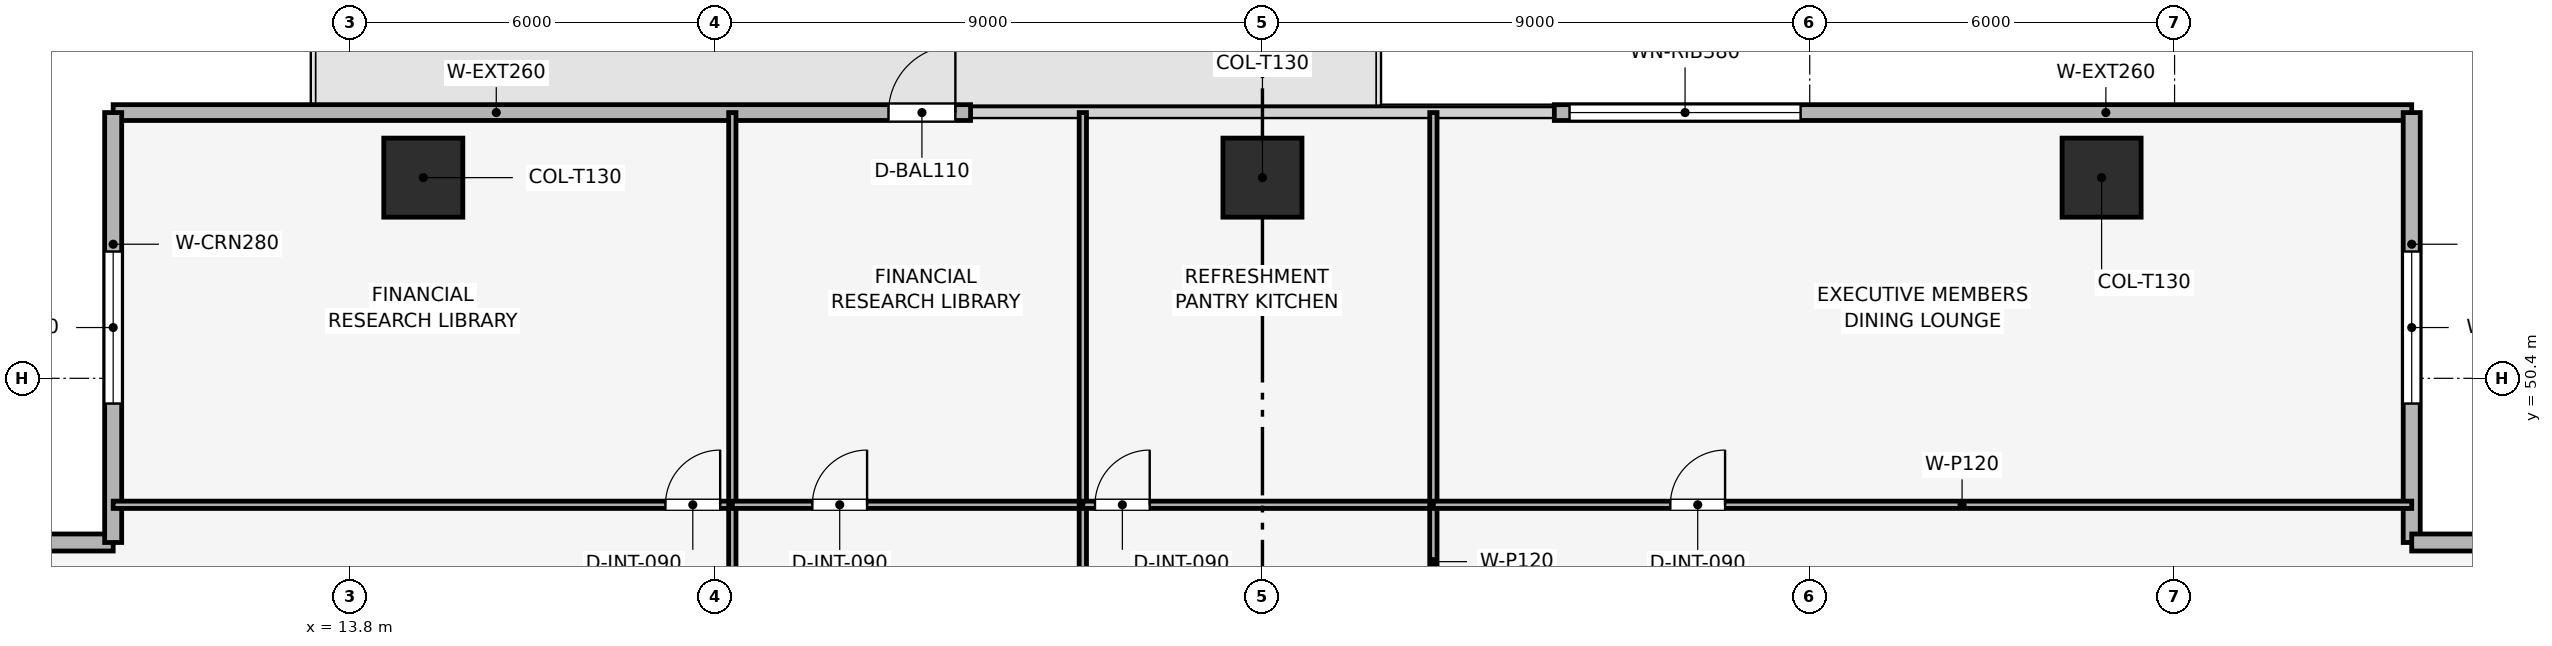
"""IFC4 building model, lengths in metres.
Left out: names, types, materials, properties, quantities, classifications, styles, units other than length and angle.
Written with IfcOpenShell. Run it as: python <this file> out.ifc"""

import sys

from ifc_helpers import new_model, si_unit, direction, frame, frame_2d, origin, origin_2d, place, context, subcontext, project, spatial, rectangle, extrude, element, fill, save


model = new_model("IFC4")
c1 = context("Model", 3, precision=1e-05, world=origin(), true_north=direction((0.0, 1.0)))
c2 = subcontext(c1, "Body", "Model", "MODEL_VIEW")
j1 = project(units=[si_unit("LENGTHUNIT", "METRE"), si_unit("PLANEANGLEUNIT", "RADIAN")], contexts=[c1])
p1 = place(None, origin())
s1 = spatial("IfcSite", under=j1, at=p1, CompositionType="ELEMENT")
p2 = place(p1, origin())
s2 = spatial("IfcBuilding", under=s1, at=p2, CompositionType="ELEMENT")
p3 = place(p2, frame((0.0, 0.0, 117.3)))
s3 = spatial("IfcBuildingStorey", under=s2, at=p3, CompositionType="ELEMENT", Elevation=117.3)
for number, where, z_axis, x_axis in (
    (1, (42.6, 53.7, 0.003), (0.0, 0.0, 1.0), (1.0, 0.0, 0.0)),
    (2, (28.8, 53.7, 0.003), (0.0, 0.0, 1.0), (1.0, 0.0, 0.0)),
    (3, (15.0, 53.7, 0.003), (0.0, 0.0, 1.0), (1.0, 0.0, 0.0)),
):
    element("IfcColumn", number, at=place(p3, frame(where, z_axis=z_axis, x_axis=x_axis)), inside=s3, PredefinedType="COLUMN", context=c2, shape_type="SweptSolid", body=[
        extrude(rectangle(XDim=1.3, YDim=1.3, at=origin_2d()), origin(), (0.0, 0.0, 1.0), 3.644),
    ])
p4 = place(p3, frame((9.9, 54.77, 0.0), z_axis=(0.0, 0.0, 1.0), x_axis=(1.0, 0.0, 0.0)))
e4 = element("IfcWall", 4, at=p4, inside=s3, PredefinedType="SOLIDWALL", context=c2, shape_type="SweptSolid", body=[
    extrude(rectangle(XDim=14.1, YDim=0.26, at=frame_2d((7.05, 0.0))), origin(), (0.0, 0.0, 1.0), 3.65),
])
p5 = place(p4, frame((12.75, 0.0, 0.0)))
e5 = element("IfcOpeningElement", 5, at=p5, cuts=e4, PredefinedType="OPENING", context=c2, shape_type="SweptSolid", body=[
    extrude(rectangle(XDim=1.1, YDim=2.2, at=frame_2d((0.55, 1.1))), frame((0.0, 0.14, 0.0), z_axis=(0.0, -1.0, 0.0), x_axis=(1.0, 0.0, 0.0)), (0.0, 0.0, 1.0), 0.28),
])
p6 = place(p3, frame((33.6, 54.77, 0.0), z_axis=(0.0, 0.0, 1.0), x_axis=(1.0, 0.0, 0.0)))
e6 = element("IfcWall", 6, at=p6, inside=s3, PredefinedType="SOLIDWALL", context=c2, shape_type="SweptSolid", body=[
    extrude(rectangle(XDim=14.1, YDim=0.26, at=frame_2d((7.05, 0.0))), origin(), (0.0, 0.0, 1.0), 3.65),
])
p7 = place(p6, frame((0.25, 0.0, 0.9)))
e7 = element("IfcOpeningElement", 7, at=p7, cuts=e6, PredefinedType="OPENING", context=c2, shape_type="SweptSolid", body=[
    extrude(rectangle(XDim=3.8, YDim=1.9, at=frame_2d((1.9, 0.95))), frame((0.0, 0.14, 0.0), z_axis=(0.0, -1.0, 0.0), x_axis=(1.0, 0.0, 0.0)), (0.0, 0.0, 1.0), 0.28),
])
p8 = place(p3, frame((2.83, 47.7, 0.0), z_axis=(0.0, 0.0, 1.0), x_axis=(1.0, 0.0, 0.0)))
e8 = element("IfcWall", 8, at=p8, inside=s3, PredefinedType="SOLIDWALL", context=c2, shape_type="SweptSolid", body=[
    extrude(rectangle(XDim=7.07, YDim=0.28, at=frame_2d((3.535, 0.0))), origin(), (0.0, 0.0, 1.0), 3.65),
])
p9 = place(p8, frame((2.285, 0.0, 0.9)))
e9 = element("IfcOpeningElement", 9, at=p9, cuts=e8, PredefinedType="OPENING", context=c2, shape_type="SweptSolid", body=[
    extrude(rectangle(XDim=2.5, YDim=1.9, at=frame_2d((1.25, 0.95))), frame((0.0, 0.15, 0.0), z_axis=(0.0, -1.0, 0.0), x_axis=(1.0, 0.0, 0.0)), (0.0, 0.0, 1.0), 0.3),
])
p10 = place(p3, frame((9.9, 47.7, 0.0), z_axis=(0.0, 0.0, 1.0), x_axis=(0.0, 1.0, 0.0)))
e10 = element("IfcWall", 10, at=p10, inside=s3, PredefinedType="SOLIDWALL", context=c2, shape_type="SweptSolid", body=[
    extrude(rectangle(XDim=7.07, YDim=0.28, at=frame_2d((3.535, 0.0))), origin(), (0.0, 0.0, 1.0), 3.65),
])
p11 = place(p10, frame((2.285, 0.0, 0.9)))
e11 = element("IfcOpeningElement", 11, at=p11, cuts=e10, PredefinedType="OPENING", context=c2, shape_type="SweptSolid", body=[
    extrude(rectangle(XDim=2.5, YDim=1.9, at=frame_2d((1.25, 0.95))), frame((0.0, 0.15, 0.0), z_axis=(0.0, -1.0, 0.0), x_axis=(1.0, 0.0, 0.0)), (0.0, 0.0, 1.0), 0.3),
])
p12 = place(p3, frame((47.7, 54.77, 0.0), z_axis=(0.0, 0.0, 1.0), x_axis=(0.0, -1.0, 0.0)))
e12 = element("IfcWall", 12, at=p12, inside=s3, PredefinedType="SOLIDWALL", context=c2, shape_type="SweptSolid", body=[
    extrude(rectangle(XDim=7.07, YDim=0.28, at=frame_2d((3.535, 0.0))), origin(), (0.0, 0.0, 1.0), 3.65),
])
p13 = place(p12, frame((2.285, 0.0, 0.9)))
e13 = element("IfcOpeningElement", 13, at=p13, cuts=e12, PredefinedType="OPENING", context=c2, shape_type="SweptSolid", body=[
    extrude(rectangle(XDim=2.5, YDim=1.9, at=frame_2d((1.25, 0.95))), frame((0.0, 0.15, 0.0), z_axis=(0.0, -1.0, 0.0), x_axis=(1.0, 0.0, 0.0)), (0.0, 0.0, 1.0), 0.3),
])
p14 = place(p3, frame((47.7, 47.7, 0.0), z_axis=(0.0, 0.0, 1.0), x_axis=(1.0, 0.0, 0.0)))
e14 = element("IfcWall", 14, at=p14, inside=s3, PredefinedType="SOLIDWALL", context=c2, shape_type="SweptSolid", body=[
    extrude(rectangle(XDim=7.07, YDim=0.28, at=frame_2d((3.535, 0.0))), origin(), (0.0, 0.0, 1.0), 3.65),
])
p15 = place(p14, frame((2.285, 0.0, 0.9)))
e15 = element("IfcOpeningElement", 15, at=p15, cuts=e14, PredefinedType="OPENING", context=c2, shape_type="SweptSolid", body=[
    extrude(rectangle(XDim=2.5, YDim=1.9, at=frame_2d((1.25, 0.95))), frame((0.0, 0.15, 0.0), z_axis=(0.0, -1.0, 0.0), x_axis=(1.0, 0.0, 0.0)), (0.0, 0.0, 1.0), 0.3),
])
p16 = place(p3, frame((9.9, 48.32, 0.0), z_axis=(0.0, 0.0, 1.0), x_axis=(1.0, 0.0, 0.0)))
e16 = element("IfcWall", 16, at=p16, inside=s3, PredefinedType="PARTITIONING", context=c2, shape_type="SweptSolid", body=[
    extrude(rectangle(XDim=10.182, YDim=0.12, at=frame_2d((5.091, 0.0))), origin(), (0.0, 0.0, 1.0), 3.035),
])
p17 = place(p16, frame((9.082, 0.0, 0.0)))
e17 = element("IfcOpeningElement", 17, at=p17, cuts=e16, PredefinedType="OPENING", context=c2, shape_type="SweptSolid", body=[
    extrude(rectangle(XDim=0.9, YDim=2.1, at=frame_2d((0.45, 1.05))), frame((0.0, 0.07, 0.0), z_axis=(0.0, -1.0, 0.0), x_axis=(1.0, 0.0, 0.0)), (0.0, 0.0, 1.0), 0.14),
])
p18 = place(p3, frame((20.082, 40.0, 0.0), z_axis=(0.0, 0.0, 1.0), x_axis=(0.0, 1.0, 0.0)))
e18 = element("IfcWall", 18, at=p18, inside=s3, PredefinedType="PARTITIONING", context=c2, shape_type="SweptSolid", body=[
    extrude(rectangle(XDim=14.77, YDim=0.12, at=frame_2d((7.385, 0.0))), origin(), (0.0, 0.0, 1.0), 3.035),
])
p19 = place(p3, frame((20.082, 48.32, 0.0), z_axis=(0.0, 0.0, 1.0), x_axis=(1.0, 0.0, 0.0)))
e19 = element("IfcWall", 19, at=p19, inside=s3, PredefinedType="PARTITIONING", context=c2, shape_type="SweptSolid", body=[
    extrude(rectangle(XDim=5.764, YDim=0.12, at=frame_2d((2.882, 0.0))), origin(), (0.0, 0.0, 1.0), 3.185),
])
p20 = place(p19, frame((1.316, 0.0, 0.0)))
e20 = element("IfcOpeningElement", 20, at=p20, cuts=e19, PredefinedType="OPENING", context=c2, shape_type="SweptSolid", body=[
    extrude(rectangle(XDim=0.9, YDim=2.1, at=frame_2d((0.45, 1.05))), frame((0.0, 0.07, 0.0), z_axis=(0.0, -1.0, 0.0), x_axis=(1.0, 0.0, 0.0)), (0.0, 0.0, 1.0), 0.14),
])
p21 = place(p3, frame((25.846, 40.0, 0.0), z_axis=(0.0, 0.0, 1.0), x_axis=(0.0, 1.0, 0.0)))
e21 = element("IfcWall", 21, at=p21, inside=s3, PredefinedType="PARTITIONING", context=c2, shape_type="SweptSolid", body=[
    extrude(rectangle(XDim=14.77, YDim=0.12, at=frame_2d((7.385, 0.0))), origin(), (0.0, 0.0, 1.0), 3.035),
])
p22 = place(p3, frame((25.846, 48.32, 0.0), z_axis=(0.0, 0.0, 1.0), x_axis=(1.0, 0.0, 0.0)))
e22 = element("IfcWall", 22, at=p22, inside=s3, PredefinedType="PARTITIONING", context=c2, shape_type="SweptSolid", body=[
    extrude(rectangle(XDim=5.765, YDim=0.12, at=frame_2d((2.883, 0.0))), origin(), (0.0, 0.0, 1.0), 3.185),
])
p23 = place(p22, frame((0.2, 0.0, 0.0)))
e23 = element("IfcOpeningElement", 23, at=p23, cuts=e22, PredefinedType="OPENING", context=c2, shape_type="SweptSolid", body=[
    extrude(rectangle(XDim=0.9, YDim=2.1, at=frame_2d((0.45, 1.05))), frame((0.0, 0.07, 0.0), z_axis=(0.0, -1.0, 0.0), x_axis=(1.0, 0.0, 0.0)), (0.0, 0.0, 1.0), 0.14),
])
p24 = place(p3, frame((31.611, 40.0, 0.0), z_axis=(0.0, 0.0, 1.0), x_axis=(0.0, 1.0, 0.0)))
e24 = element("IfcWall", 24, at=p24, inside=s3, PredefinedType="PARTITIONING", context=c2, shape_type="SweptSolid", body=[
    extrude(rectangle(XDim=14.77, YDim=0.12, at=frame_2d((7.385, 0.0))), origin(), (0.0, 0.0, 1.0), 3.035),
])
p25 = place(p3, frame((31.611, 48.32, 0.0), z_axis=(0.0, 0.0, 1.0), x_axis=(1.0, 0.0, 0.0)))
e25 = element("IfcWall", 25, at=p25, inside=s3, PredefinedType="PARTITIONING", context=c2, shape_type="SweptSolid", body=[
    extrude(rectangle(XDim=16.089, YDim=0.12, at=frame_2d((8.044, 0.0))), origin(), (0.0, 0.0, 1.0), 3.035),
])
p26 = place(p25, frame((3.897, 0.0, 0.0)))
e26 = element("IfcOpeningElement", 26, at=p26, cuts=e25, PredefinedType="OPENING", context=c2, shape_type="SweptSolid", body=[
    extrude(rectangle(XDim=0.9, YDim=2.1, at=frame_2d((0.45, 1.05))), frame((0.0, 0.07, 0.0), z_axis=(0.0, -1.0, 0.0), x_axis=(1.0, 0.0, 0.0)), (0.0, 0.0, 1.0), 0.14),
])
p27 = place(p5, origin())
e27 = element("IfcDoor", 27, at=p27, inside=s3, OperationType="SINGLE_SWING_RIGHT", PredefinedType="DOOR", context=c2, shape_type="SweptSolid", body=[
    extrude(rectangle(XDim=1.1, YDim=2.2, at=frame_2d((0.55, 1.1))), frame((0.0, 0.025, 0.0), z_axis=(0.0, -1.0, 0.0), x_axis=(1.0, 0.0, 0.0)), (0.0, 0.0, 1.0), 0.05),
])
fill(e5, e27)
p28 = place(p7, origin())
e28 = element("IfcWindow", 28, at=p28, inside=s3, PartitioningType="SINGLE_PANEL", PredefinedType="WINDOW", context=c2, shape_type="SweptSolid", body=[
    extrude(rectangle(XDim=3.8, YDim=1.9, at=frame_2d((1.9, 0.95))), frame((0.0, 0.03, 0.0), z_axis=(0.0, -1.0, 0.0), x_axis=(1.0, 0.0, 0.0)), (0.0, 0.0, 1.0), 0.06),
])
fill(e7, e28)
p29 = place(p11, origin())
e29 = element("IfcWindow", 29, at=p29, inside=s3, PartitioningType="SINGLE_PANEL", PredefinedType="WINDOW", context=c2, shape_type="SweptSolid", body=[
    extrude(rectangle(XDim=2.5, YDim=1.9, at=frame_2d((1.25, 0.95))), frame((0.0, 0.03, 0.0), z_axis=(0.0, -1.0, 0.0), x_axis=(1.0, 0.0, 0.0)), (0.0, 0.0, 1.0), 0.06),
])
fill(e11, e29)
p30 = place(p13, origin())
e30 = element("IfcWindow", 30, at=p30, inside=s3, PartitioningType="SINGLE_PANEL", PredefinedType="WINDOW", context=c2, shape_type="SweptSolid", body=[
    extrude(rectangle(XDim=2.5, YDim=1.9, at=frame_2d((1.25, 0.95))), frame((0.0, 0.03, 0.0), z_axis=(0.0, -1.0, 0.0), x_axis=(1.0, 0.0, 0.0)), (0.0, 0.0, 1.0), 0.06),
])
fill(e13, e30)
p31 = place(p17, origin())
e31 = element("IfcDoor", 31, at=p31, inside=s3, OperationType="SINGLE_SWING_RIGHT", PredefinedType="DOOR", context=c2, shape_type="SweptSolid", body=[
    extrude(rectangle(XDim=0.9, YDim=2.1, at=frame_2d((0.45, 1.05))), frame((0.0, 0.025, 0.0), z_axis=(0.0, -1.0, 0.0), x_axis=(1.0, 0.0, 0.0)), (0.0, 0.0, 1.0), 0.05),
])
fill(e17, e31)
p32 = place(p20, origin())
e32 = element("IfcDoor", 32, at=p32, inside=s3, OperationType="SINGLE_SWING_RIGHT", PredefinedType="DOOR", context=c2, shape_type="SweptSolid", body=[
    extrude(rectangle(XDim=0.9, YDim=2.1, at=frame_2d((0.45, 1.05))), frame((0.0, 0.025, 0.0), z_axis=(0.0, -1.0, 0.0), x_axis=(1.0, 0.0, 0.0)), (0.0, 0.0, 1.0), 0.05),
])
fill(e20, e32)
p33 = place(p23, origin())
e33 = element("IfcDoor", 33, at=p33, inside=s3, OperationType="SINGLE_SWING_RIGHT", PredefinedType="DOOR", context=c2, shape_type="SweptSolid", body=[
    extrude(rectangle(XDim=0.9, YDim=2.1, at=frame_2d((0.45, 1.05))), frame((0.0, 0.025, 0.0), z_axis=(0.0, -1.0, 0.0), x_axis=(1.0, 0.0, 0.0)), (0.0, 0.0, 1.0), 0.05),
])
fill(e23, e33)
p34 = place(p26, origin())
e34 = element("IfcDoor", 34, at=p34, inside=s3, OperationType="SINGLE_SWING_RIGHT", PredefinedType="DOOR", context=c2, shape_type="SweptSolid", body=[
    extrude(rectangle(XDim=0.9, YDim=2.1, at=frame_2d((0.45, 1.05))), frame((0.0, 0.025, 0.0), z_axis=(0.0, -1.0, 0.0), x_axis=(1.0, 0.0, 0.0)), (0.0, 0.0, 1.0), 0.05),
])
fill(e26, e34)
save(model, sys.argv[1])
